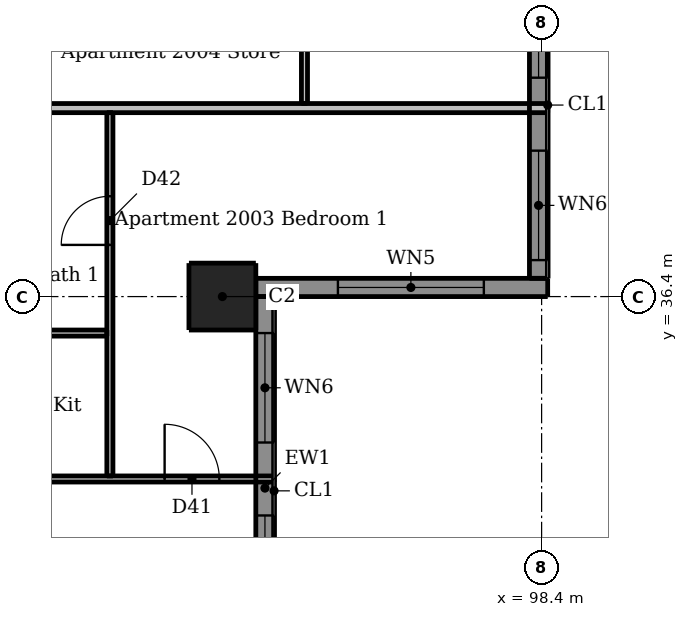
"""IFC4 building model, lengths in metres.
Left out: names, types, materials, properties, quantities, classifications, styles, units other than length and angle.
Written with IfcOpenShell. Run it as: python <this file> out.ifc"""

import sys

from ifc_helpers import new_model, si_unit, direction, frame, frame_2d, origin, origin_2d, place, context, subcontext, project, spatial, rectangle, extrude, element, fill, save


model = new_model("IFC4")
c1 = context("Model", 3, precision=1e-05, world=origin(), true_north=direction((0.0, 1.0)))
c2 = subcontext(c1, "Body", "Model", "MODEL_VIEW")
j1 = project(units=[si_unit("LENGTHUNIT", "METRE"), si_unit("PLANEANGLEUNIT", "RADIAN")], contexts=[c1])
p1 = place(None, origin())
s1 = spatial("IfcSite", under=j1, at=p1, CompositionType="ELEMENT")
p2 = place(p1, origin())
s2 = spatial("IfcBuilding", under=s1, at=p2, CompositionType="ELEMENT")
p3 = place(p2, frame((0.0, 0.0, 78.7)))
s3 = spatial("IfcBuildingStorey", under=s2, at=p3, CompositionType="ELEMENT", Elevation=78.7)
p4 = place(p3, frame((93.15, 36.4, 0.0), z_axis=(0.0, 0.0, 1.0), x_axis=(1.0, 0.0, 0.0)))
e1 = element("IfcColumn", 1, at=p4, inside=s3, PredefinedType="COLUMN", context=c2, shape_type="SweptSolid", body=[
    extrude(rectangle(XDim=1.1, YDim=1.1, at=origin_2d()), origin(), (0.0, 0.0, 1.0), 3.05),
])
p5 = place(p3, frame((93.7, 36.55, 0.0), z_axis=(0.0, 0.0, 1.0), x_axis=(1.0, 0.0, 0.0)))
e2 = element("IfcWall", 2, at=p5, inside=s3, PredefinedType="SOLIDWALL", context=c2, shape_type="SweptSolid", body=[
    extrude(rectangle(XDim=4.8, YDim=0.3, at=frame_2d((2.4, 0.0))), origin(), (0.0, 0.0, 1.0), 3.05),
])
p6 = place(p5, frame((1.35, 0.0, 0.15)))
e3 = element("IfcOpeningElement", 3, at=p6, cuts=e2, PredefinedType="OPENING", context=c2, shape_type="SweptSolid", body=[
    extrude(rectangle(XDim=2.4, YDim=2.1, at=frame_2d((1.2, 1.05))), frame((0.0, 0.16, 0.0), z_axis=(0.0, -1.0, 0.0), x_axis=(1.0, 0.0, 0.0)), (0.0, 0.0, 1.0), 0.32),
])
p7 = place(p3, frame((93.85, 30.1, 0.0), z_axis=(0.0, 0.0, 1.0), x_axis=(0.0, 1.0, 0.0)))
e4 = element("IfcWall", 4, at=p7, inside=s3, PredefinedType="SOLIDWALL", context=c2, shape_type="SweptSolid", body=[
    extrude(rectangle(XDim=6.3, YDim=0.3, at=frame_2d((3.15, 0.0))), origin(), (0.0, 0.0, 1.0), 3.05),
])
p8 = place(p7, frame((0.9, 0.0, 0.15)))
e5 = element("IfcOpeningElement", 5, at=p8, cuts=e4, PredefinedType="OPENING", context=c2, shape_type="SweptSolid", body=[
    extrude(rectangle(XDim=1.8, YDim=2.1, at=frame_2d((0.9, 1.05))), frame((0.0, 0.16, 0.0), z_axis=(0.0, -1.0, 0.0), x_axis=(1.0, 0.0, 0.0)), (0.0, 0.0, 1.0), 0.32),
])
p9 = place(p7, frame((3.9, 0.0, 0.15)))
e6 = element("IfcOpeningElement", 6, at=p9, cuts=e4, PredefinedType="OPENING", context=c2, shape_type="SweptSolid", body=[
    extrude(rectangle(XDim=1.8, YDim=2.1, at=frame_2d((0.9, 1.05))), frame((0.0, 0.16, 0.0), z_axis=(0.0, -1.0, 0.0), x_axis=(1.0, 0.0, 0.0)), (0.0, 0.0, 1.0), 0.32),
])
p10 = place(p3, frame((98.35, 36.7, 0.0), z_axis=(0.0, 0.0, 1.0), x_axis=(0.0, 1.0, 0.0)))
e7 = element("IfcWall", 7, at=p10, inside=s3, PredefinedType="SOLIDWALL", context=c2, shape_type="SweptSolid", body=[
    extrude(rectangle(XDim=5.7, YDim=0.3, at=frame_2d((2.85, 0.0))), origin(), (0.0, 0.0, 1.0), 3.05),
])
p11 = place(p10, frame((0.3, 0.0, 0.15)))
e8 = element("IfcOpeningElement", 8, at=p11, cuts=e7, PredefinedType="OPENING", context=c2, shape_type="SweptSolid", body=[
    extrude(rectangle(XDim=1.8, YDim=2.1, at=frame_2d((0.9, 1.05))), frame((0.0, 0.16, 0.0), z_axis=(0.0, -1.0, 0.0), x_axis=(1.0, 0.0, 0.0)), (0.0, 0.0, 1.0), 0.32),
])
p12 = place(p10, frame((3.3, 0.0, 0.15)))
e9 = element("IfcOpeningElement", 9, at=p12, cuts=e7, PredefinedType="OPENING", context=c2, shape_type="SweptSolid", body=[
    extrude(rectangle(XDim=1.8, YDim=2.1, at=frame_2d((0.9, 1.05))), frame((0.0, 0.16, 0.0), z_axis=(0.0, -1.0, 0.0), x_axis=(1.0, 0.0, 0.0)), (0.0, 0.0, 1.0), 0.32),
])
p13 = place(p3, frame((91.3, 33.45, 0.0), z_axis=(0.0, 0.0, 1.0), x_axis=(0.0, 1.0, 0.0)))
e10 = element("IfcWall", 10, at=p13, inside=s3, PredefinedType="PARTITIONING", context=c2, shape_type="SweptSolid", body=[
    extrude(rectangle(XDim=5.975, YDim=0.1, at=frame_2d((2.988, 0.0))), origin(), (0.0, 0.0, 1.0), 3.05),
])
p14 = place(p13, frame((3.8, 0.0, 0.0)))
e11 = element("IfcOpeningElement", 11, at=p14, cuts=e10, PredefinedType="OPENING", context=c2, shape_type="SweptSolid", body=[
    extrude(rectangle(XDim=0.8, YDim=2.1, at=frame_2d((0.4, 1.05))), frame((0.0, 0.06, 0.0), z_axis=(0.0, -1.0, 0.0), x_axis=(1.0, 0.0, 0.0)), (0.0, 0.0, 1.0), 0.12),
])
p15 = place(p3, frame((94.5, 39.575, 0.0), z_axis=(0.0, 0.0, 1.0), x_axis=(0.0, 1.0, 0.0)))
e12 = element("IfcWall", 12, at=p15, inside=s3, PredefinedType="PARTITIONING", context=c2, shape_type="SweptSolid", body=[
    extrude(rectangle(XDim=1.775, YDim=0.1, at=frame_2d((0.888, 0.0))), origin(), (0.0, 0.0, 1.0), 3.05),
])
p16 = place(p3, frame((88.375, 35.8, 0.0), z_axis=(0.0, 0.0, 1.0), x_axis=(1.0, 0.0, 0.0)))
e13 = element("IfcWall", 13, at=p16, inside=s3, PredefinedType="PARTITIONING", context=c2, shape_type="SweptSolid", body=[
    extrude(rectangle(XDim=2.875, YDim=0.1, at=frame_2d((1.438, 0.0))), origin(), (0.0, 0.0, 1.0), 3.05),
])
p17 = place(p3, frame((88.375, 33.4, 0.0), z_axis=(0.0, 0.0, 1.0), x_axis=(1.0, 0.0, 0.0)))
e14 = element("IfcWall", 14, at=p17, inside=s3, PredefinedType="PARTITIONING", context=c2, shape_type="SweptSolid", body=[
    extrude(rectangle(XDim=5.625, YDim=0.1, at=frame_2d((2.812, 0.0))), origin(), (0.0, 0.0, 1.0), 3.05),
])
p18 = place(p17, frame((0.975, 0.0, 0.0)))
e15 = element("IfcOpeningElement", 15, at=p18, cuts=e14, PredefinedType="OPENING", context=c2, shape_type="SweptSolid", body=[
    extrude(rectangle(XDim=0.9, YDim=2.1, at=frame_2d((0.45, 1.05))), frame((0.0, 0.06, 0.0), z_axis=(0.0, -1.0, 0.0), x_axis=(1.0, 0.0, 0.0)), (0.0, 0.0, 1.0), 0.12),
])
p19 = place(p17, frame((3.825, 0.0, 0.0)))
e16 = element("IfcOpeningElement", 16, at=p19, cuts=e14, PredefinedType="OPENING", context=c2, shape_type="SweptSolid", body=[
    extrude(rectangle(XDim=0.9, YDim=2.1, at=frame_2d((0.45, 1.05))), frame((0.0, 0.06, 0.0), z_axis=(0.0, -1.0, 0.0), x_axis=(1.0, 0.0, 0.0)), (0.0, 0.0, 1.0), 0.12),
])
p20 = place(p3, frame((88.375, 39.5, 0.0), z_axis=(0.0, 0.0, 1.0), x_axis=(1.0, 0.0, 0.0)))
e17 = element("IfcWall", 17, at=p20, inside=s3, PredefinedType="PARTITIONING", context=c2, shape_type="SweptSolid", body=[
    extrude(rectangle(XDim=10.125, YDim=0.15, at=frame_2d((5.062, 0.0))), origin(), (0.0, 0.0, 1.0), 3.05),
])
p21 = place(p6, origin())
e18 = element("IfcWindow", 18, at=p21, inside=s3, PartitioningType="DOUBLE_PANEL_VERTICAL", PredefinedType="WINDOW", context=c2, shape_type="SweptSolid", body=[
    extrude(rectangle(XDim=2.4, YDim=2.1, at=frame_2d((1.2, 1.05))), frame((0.0, 0.03, 0.0), z_axis=(0.0, -1.0, 0.0), x_axis=(1.0, 0.0, 0.0)), (0.0, 0.0, 1.0), 0.06),
])
fill(e3, e18)
p22 = place(p8, origin())
e19 = element("IfcWindow", 19, at=p22, inside=s3, PartitioningType="DOUBLE_PANEL_VERTICAL", PredefinedType="WINDOW", context=c2, shape_type="SweptSolid", body=[
    extrude(rectangle(XDim=1.8, YDim=2.1, at=frame_2d((0.9, 1.05))), frame((0.0, 0.03, 0.0), z_axis=(0.0, -1.0, 0.0), x_axis=(1.0, 0.0, 0.0)), (0.0, 0.0, 1.0), 0.06),
])
fill(e5, e19)
p23 = place(p9, origin())
e20 = element("IfcWindow", 20, at=p23, inside=s3, PartitioningType="DOUBLE_PANEL_VERTICAL", PredefinedType="WINDOW", context=c2, shape_type="SweptSolid", body=[
    extrude(rectangle(XDim=1.8, YDim=2.1, at=frame_2d((0.9, 1.05))), frame((0.0, 0.03, 0.0), z_axis=(0.0, -1.0, 0.0), x_axis=(1.0, 0.0, 0.0)), (0.0, 0.0, 1.0), 0.06),
])
fill(e6, e20)
p24 = place(p11, origin())
e21 = element("IfcWindow", 21, at=p24, inside=s3, PartitioningType="DOUBLE_PANEL_VERTICAL", PredefinedType="WINDOW", context=c2, shape_type="SweptSolid", body=[
    extrude(rectangle(XDim=1.8, YDim=2.1, at=frame_2d((0.9, 1.05))), frame((0.0, 0.03, 0.0), z_axis=(0.0, -1.0, 0.0), x_axis=(1.0, 0.0, 0.0)), (0.0, 0.0, 1.0), 0.06),
])
fill(e8, e21)
p25 = place(p12, origin())
e22 = element("IfcWindow", 22, at=p25, inside=s3, PartitioningType="DOUBLE_PANEL_VERTICAL", PredefinedType="WINDOW", context=c2, shape_type="SweptSolid", body=[
    extrude(rectangle(XDim=1.8, YDim=2.1, at=frame_2d((0.9, 1.05))), frame((0.0, 0.03, 0.0), z_axis=(0.0, -1.0, 0.0), x_axis=(1.0, 0.0, 0.0)), (0.0, 0.0, 1.0), 0.06),
])
fill(e9, e22)
p26 = place(p19, origin())
e23 = element("IfcDoor", 23, at=p26, inside=s3, OperationType="SINGLE_SWING_LEFT", PredefinedType="DOOR", context=c2, shape_type="SweptSolid", body=[
    extrude(rectangle(XDim=0.9, YDim=2.1, at=frame_2d((0.45, 1.05))), frame((0.0, 0.025, 0.0), z_axis=(0.0, -1.0, 0.0), x_axis=(1.0, 0.0, 0.0)), (0.0, 0.0, 1.0), 0.05),
])
fill(e16, e23)
p27 = place(p14, origin())
e24 = element("IfcDoor", 24, at=p27, inside=s3, OperationType="SINGLE_SWING_LEFT", PredefinedType="DOOR", context=c2, shape_type="SweptSolid", body=[
    extrude(rectangle(XDim=0.8, YDim=2.1, at=frame_2d((0.4, 1.05))), frame((0.0, 0.025, 0.0), z_axis=(0.0, -1.0, 0.0), x_axis=(1.0, 0.0, 0.0)), (0.0, 0.0, 1.0), 0.05),
])
fill(e11, e24)
save(model, sys.argv[1])
